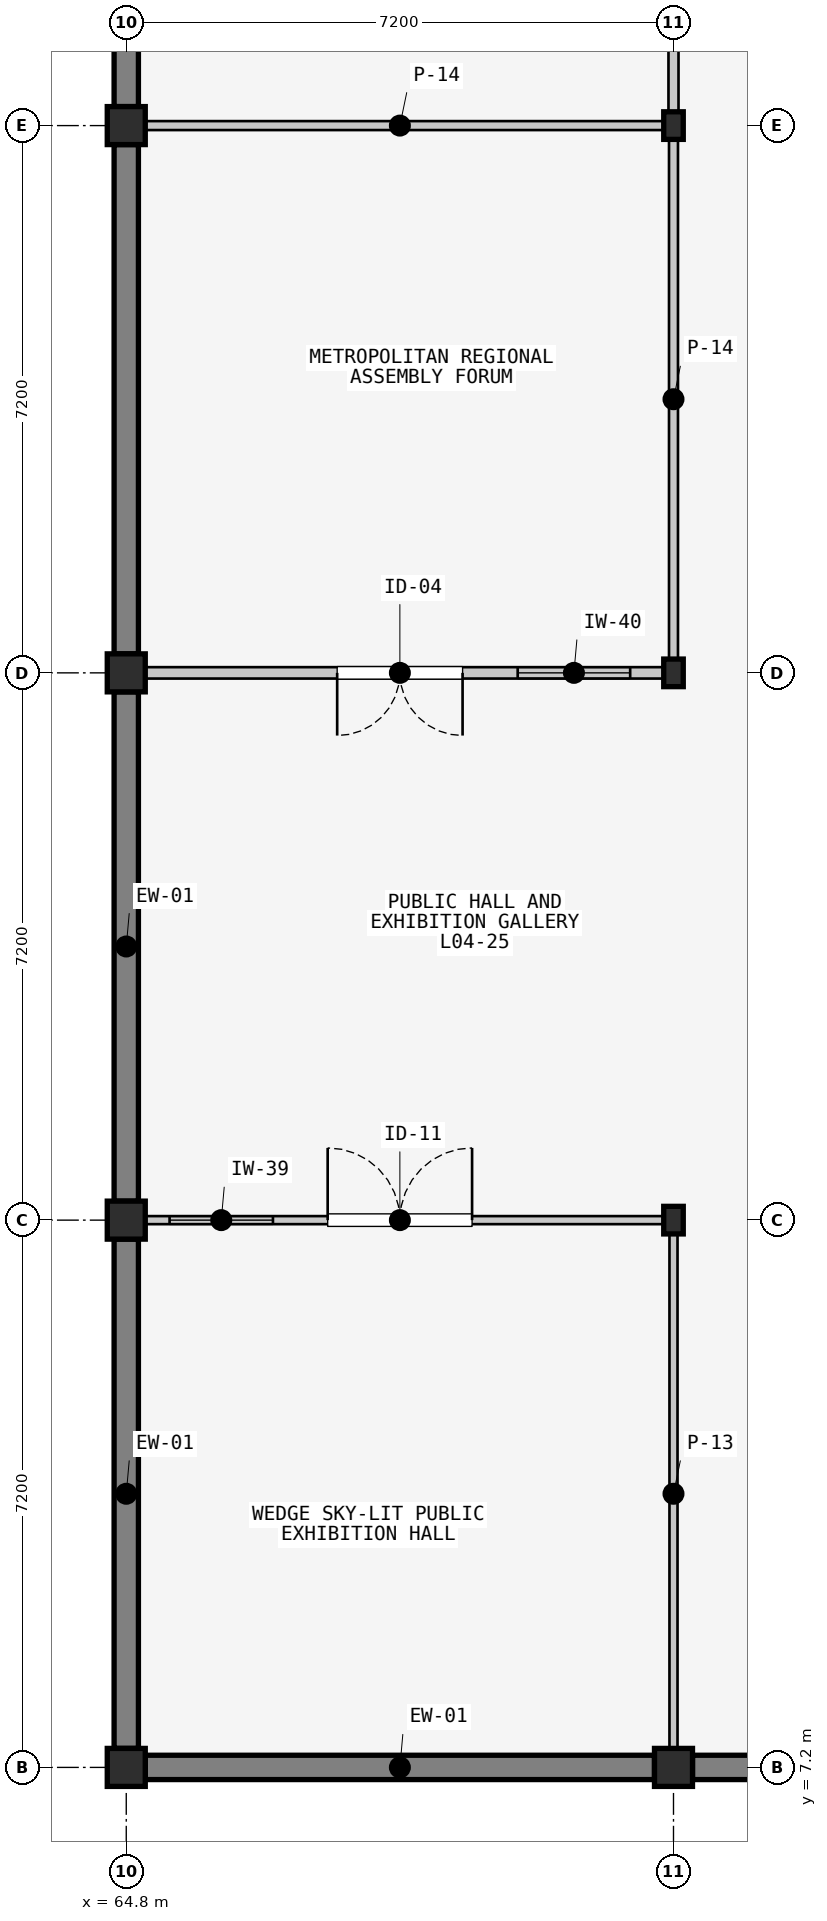
"""IFC4 building model, lengths in metres.
Left out: names, types, materials, properties, quantities, classifications, styles, units other than length and angle.
Written with IfcOpenShell. Run it as: python <this file> out.ifc"""

import sys

from ifc_helpers import new_model, si_unit, direction, frame, frame_2d, origin, origin_2d, place, context, subcontext, project, spatial, rectangle, i_section, extrude, element, fill, save


model = new_model("IFC4")
c1 = context("Model", 3, precision=1e-05, world=origin(), true_north=direction((0.0, 1.0)))
c2 = subcontext(c1, "Body", "Model", "MODEL_VIEW")
j1 = project(units=[si_unit("LENGTHUNIT", "METRE"), si_unit("PLANEANGLEUNIT", "RADIAN")], contexts=[c1])
p1 = place(None, origin())
s1 = spatial("IfcSite", under=j1, at=p1, CompositionType="ELEMENT")
p2 = place(p1, origin())
s2 = spatial("IfcBuilding", under=s1, at=p2, CompositionType="ELEMENT")
p3 = place(p2, frame((0.0, 0.0, 14.1)))
s3 = spatial("IfcBuildingStorey", under=s2, at=p3, CompositionType="ELEMENT", Elevation=14.1)
p4 = place(p3, frame((64.8, 7.2, 0.0), z_axis=(0.0, 0.0, 1.0), x_axis=(1.0, 0.0, 0.0)))
e1 = element("IfcColumn", 1, at=p4, inside=s3, PredefinedType="COLUMN", context=c2, shape_type="SweptSolid", body=[
    extrude(rectangle(XDim=0.5, YDim=0.5, at=origin_2d()), origin(), (0.0, 0.0, 1.0), 4.876),
])
p5 = place(p3, frame((64.8, 14.4, 0.0), z_axis=(0.0, 0.0, 1.0), x_axis=(1.0, 0.0, 0.0)))
e2 = element("IfcColumn", 2, at=p5, inside=s3, PredefinedType="COLUMN", context=c2, shape_type="SweptSolid", body=[
    extrude(rectangle(XDim=0.5, YDim=0.5, at=origin_2d()), origin(), (0.0, 0.0, 1.0), 6.219),
])
p6 = place(p3, frame((64.8, 21.6, 0.0), z_axis=(0.0, 0.0, 1.0), x_axis=(1.0, 0.0, 0.0)))
e3 = element("IfcColumn", 3, at=p6, inside=s3, PredefinedType="COLUMN", context=c2, shape_type="SweptSolid", body=[
    extrude(rectangle(XDim=0.5, YDim=0.5, at=origin_2d()), origin(), (0.0, 0.0, 1.0), 7.562),
])
p7 = place(p3, frame((64.8, 28.8, 0.0), z_axis=(0.0, 0.0, 1.0), x_axis=(1.0, 0.0, 0.0)))
e4 = element("IfcColumn", 4, at=p7, inside=s3, PredefinedType="COLUMN", context=c2, shape_type="SweptSolid", body=[
    extrude(rectangle(XDim=0.5, YDim=0.5, at=origin_2d()), origin(), (0.0, 0.0, 1.0), 8.905),
])
p8 = place(p3, frame((72.0, 7.2, 0.0), z_axis=(0.0, 0.0, 1.0), x_axis=(1.0, 0.0, 0.0)))
e5 = element("IfcColumn", 5, at=p8, inside=s3, PredefinedType="COLUMN", context=c2, shape_type="SweptSolid", body=[
    extrude(rectangle(XDim=0.5, YDim=0.5, at=origin_2d()), origin(), (0.0, 0.0, 1.0), 4.905),
])
p9 = place(p3, frame((72.0, 14.4, 0.0), z_axis=(0.0, 0.0, 1.0), x_axis=(1.0, 0.0, 0.0)))
e6 = element("IfcColumn", 6, at=p9, inside=s3, PredefinedType="COLUMN", context=c2, shape_type="SweptSolid", body=[
    extrude(i_section(OverallWidth=0.257, OverallDepth=0.363, WebThickness=0.013, FlangeThickness=0.022, FilletRadius=0.015, at=origin_2d()), origin(), (0.0, 0.0, 1.0), 6.248),
])
p10 = place(p3, frame((72.0, 21.6, 0.0), z_axis=(0.0, 0.0, 1.0), x_axis=(1.0, 0.0, 0.0)))
e7 = element("IfcColumn", 7, at=p10, inside=s3, PredefinedType="COLUMN", context=c2, shape_type="SweptSolid", body=[
    extrude(i_section(OverallWidth=0.257, OverallDepth=0.363, WebThickness=0.013, FlangeThickness=0.022, FilletRadius=0.015, at=origin_2d()), origin(), (0.0, 0.0, 1.0), 7.59),
])
p11 = place(p3, frame((72.0, 28.8, 0.0), z_axis=(0.0, 0.0, 1.0), x_axis=(1.0, 0.0, 0.0)))
e8 = element("IfcColumn", 8, at=p11, inside=s3, PredefinedType="COLUMN", context=c2, shape_type="SweptSolid", body=[
    extrude(i_section(OverallWidth=0.257, OverallDepth=0.363, WebThickness=0.013, FlangeThickness=0.022, FilletRadius=0.015, at=origin_2d()), origin(), (0.0, 0.0, 1.0), 8.933),
])
p12 = place(p3, frame((71.75, 7.2, 0.0), z_axis=(0.0, 0.0, 1.0), x_axis=(-1.0, 0.0, 0.0)))
e9 = element("IfcWall", 9, at=p12, inside=s3, PredefinedType="SOLIDWALL", context=c2, shape_type="SweptSolid", body=[
    extrude(rectangle(XDim=6.7, YDim=0.32, at=frame_2d((3.35, 0.0))), origin(), (0.0, 0.0, 1.0), 4.149),
])
p13 = place(p3, frame((64.8, 7.45, 0.0), z_axis=(0.0, 0.0, 1.0), x_axis=(0.0, 1.0, 0.0)))
e10 = element("IfcWall", 10, at=p13, inside=s3, PredefinedType="SOLIDWALL", context=c2, shape_type="SweptSolid", body=[
    extrude(rectangle(XDim=6.7, YDim=0.32, at=frame_2d((3.35, 0.0))), origin(), (0.0, 0.0, 1.0), 4.193),
])
p14 = place(p3, frame((64.8, 14.65, 0.0), z_axis=(0.0, 0.0, 1.0), x_axis=(0.0, 1.0, 0.0)))
e11 = element("IfcWall", 11, at=p14, inside=s3, PredefinedType="SOLIDWALL", context=c2, shape_type="SweptSolid", body=[
    extrude(rectangle(XDim=6.7, YDim=0.32, at=frame_2d((3.35, 0.0))), origin(), (0.0, 0.0, 1.0), 5.536),
])
p15 = place(p3, frame((64.8, 21.85, 0.0), z_axis=(0.0, 0.0, 1.0), x_axis=(0.0, 1.0, 0.0)))
e12 = element("IfcWall", 12, at=p15, inside=s3, PredefinedType="SOLIDWALL", context=c2, shape_type="SweptSolid", body=[
    extrude(rectangle(XDim=6.7, YDim=0.32, at=frame_2d((3.35, 0.0))), origin(), (0.0, 0.0, 1.0), 6.879),
])
p16 = place(p3, frame((64.8, 29.05, 0.0), z_axis=(0.0, 0.0, 1.0), x_axis=(0.0, 1.0, 0.0)))
e13 = element("IfcWall", 13, at=p16, inside=s3, PredefinedType="SOLIDWALL", context=c2, shape_type="SweptSolid", body=[
    extrude(rectangle(XDim=6.7, YDim=0.32, at=frame_2d((3.35, 0.0))), origin(), (0.0, 0.0, 1.0), 8.222),
])
p17 = place(p16, frame((0.908, 0.0, 0.95)))
e14 = element("IfcOpeningElement", 14, at=p17, cuts=e13, PredefinedType="OPENING", context=c2, shape_type="SweptSolid", body=[
    extrude(rectangle(XDim=1.4, YDim=2.1, at=frame_2d((0.7, 1.05))), frame((0.0, 0.17, 0.0), z_axis=(0.0, -1.0, 0.0), x_axis=(1.0, 0.0, 0.0)), (0.0, 0.0, 1.0), 0.34),
])
p18 = place(p16, frame((0.908, 0.0, 4.55)))
e15 = element("IfcOpeningElement", 15, at=p18, cuts=e13, PredefinedType="OPENING", context=c2, shape_type="SweptSolid", body=[
    extrude(rectangle(XDim=1.4, YDim=2.1, at=frame_2d((0.7, 1.05))), frame((0.0, 0.17, 0.0), z_axis=(0.0, -1.0, 0.0), x_axis=(1.0, 0.0, 0.0)), (0.0, 0.0, 1.0), 0.34),
])
p19 = place(p16, frame((4.392, 0.0, 0.95)))
e16 = element("IfcOpeningElement", 16, at=p19, cuts=e13, PredefinedType="OPENING", context=c2, shape_type="SweptSolid", body=[
    extrude(rectangle(XDim=1.4, YDim=2.1, at=frame_2d((0.7, 1.05))), frame((0.0, 0.17, 0.0), z_axis=(0.0, -1.0, 0.0), x_axis=(1.0, 0.0, 0.0)), (0.0, 0.0, 1.0), 0.34),
])
p20 = place(p16, frame((4.392, 0.0, 4.55)))
e17 = element("IfcOpeningElement", 17, at=p20, cuts=e13, PredefinedType="OPENING", context=c2, shape_type="SweptSolid", body=[
    extrude(rectangle(XDim=1.4, YDim=2.1, at=frame_2d((0.7, 1.05))), frame((0.0, 0.17, 0.0), z_axis=(0.0, -1.0, 0.0), x_axis=(1.0, 0.0, 0.0)), (0.0, 0.0, 1.0), 0.34),
])
p21 = place(p3, frame((78.95, 7.2, 0.0), z_axis=(0.0, 0.0, 1.0), x_axis=(-1.0, 0.0, 0.0)))
e18 = element("IfcWall", 18, at=p21, inside=s3, PredefinedType="SOLIDWALL", context=c2, shape_type="SweptSolid", body=[
    extrude(rectangle(XDim=6.7, YDim=0.32, at=frame_2d((3.35, 0.0))), origin(), (0.0, 0.0, 1.0), 4.177),
])
p22 = place(p3, frame((64.92, 14.4, 0.0), z_axis=(0.0, 0.0, 1.0), x_axis=(1.0, 0.0, 0.0)))
e19 = element("IfcWall", 19, at=p22, inside=s3, PredefinedType="PARTITIONING", context=c2, shape_type="SweptSolid", body=[
    extrude(rectangle(XDim=6.96, YDim=0.106, at=frame_2d((3.48, 0.0))), origin(), (0.0, 0.0, 1.0), 3.72),
])
p23 = place(p22, frame((2.53, 0.0, 0.0)))
e20 = element("IfcOpeningElement", 20, at=p23, cuts=e19, PredefinedType="OPENING", context=c2, shape_type="SweptSolid", body=[
    extrude(rectangle(XDim=1.9, YDim=2.45, at=frame_2d((0.95, 1.225))), frame((0.0, 0.063, 0.0), z_axis=(0.0, -1.0, 0.0), x_axis=(1.0, 0.0, 0.0)), (0.0, 0.0, 1.0), 0.126),
])
p24 = place(p22, frame((0.45, 0.0, 1.05)))
e21 = element("IfcOpeningElement", 21, at=p24, cuts=e19, PredefinedType="OPENING", context=c2, shape_type="SweptSolid", body=[
    extrude(rectangle(XDim=1.36, YDim=1.1, at=frame_2d((0.68, 0.55))), frame((0.0, 0.063, 0.0), z_axis=(0.0, -1.0, 0.0), x_axis=(1.0, 0.0, 0.0)), (0.0, 0.0, 1.0), 0.126),
])
p25 = place(p3, frame((72.0, 14.28, 0.0), z_axis=(0.0, 0.0, 1.0), x_axis=(0.0, -1.0, 0.0)))
e22 = element("IfcWall", 22, at=p25, inside=s3, PredefinedType="PARTITIONING", context=c2, shape_type="SweptSolid", body=[
    extrude(rectangle(XDim=6.96, YDim=0.106, at=frame_2d((3.48, 0.0))), origin(), (0.0, 0.0, 1.0), 3.72),
])
p26 = place(p3, frame((71.88, 21.6, 0.0), z_axis=(0.0, 0.0, 1.0), x_axis=(-1.0, 0.0, 0.0)))
e23 = element("IfcWall", 23, at=p26, inside=s3, PredefinedType="PARTITIONING", context=c2, shape_type="SweptSolid", body=[
    extrude(rectangle(XDim=6.96, YDim=0.15, at=frame_2d((3.48, 0.0))), origin(), (0.0, 0.0, 1.0), 3.72),
])
p27 = place(p26, frame((2.655, 0.0, 0.0)))
e24 = element("IfcOpeningElement", 24, at=p27, cuts=e23, PredefinedType="OPENING", context=c2, shape_type="SweptSolid", body=[
    extrude(rectangle(XDim=1.65, YDim=2.35, at=frame_2d((0.825, 1.175))), frame((0.0, 0.085, 0.0), z_axis=(0.0, -1.0, 0.0), x_axis=(1.0, 0.0, 0.0)), (0.0, 0.0, 1.0), 0.17),
])
p28 = place(p26, frame((0.45, 0.0, 1.05)))
e25 = element("IfcOpeningElement", 25, at=p28, cuts=e23, PredefinedType="OPENING", context=c2, shape_type="SweptSolid", body=[
    extrude(rectangle(XDim=1.48, YDim=1.34, at=frame_2d((0.74, 0.67))), frame((0.0, 0.085, 0.0), z_axis=(0.0, -1.0, 0.0), x_axis=(1.0, 0.0, 0.0)), (0.0, 0.0, 1.0), 0.17),
])
for number, where, z_axis, x_axis in (
    (26, (64.92, 28.8, 0.0), (0.0, 0.0, 1.0), (1.0, 0.0, 0.0)),
    (27, (72.0, 28.68, 0.0), (0.0, 0.0, 1.0), (0.0, -1.0, 0.0)),
):
    element("IfcWall", number, at=place(p3, frame(where, z_axis=z_axis, x_axis=x_axis)), inside=s3, PredefinedType="PARTITIONING", context=c2, shape_type="SweptSolid", body=[
        extrude(rectangle(XDim=6.96, YDim=0.118, at=frame_2d((3.48, 0.0))), origin(), (0.0, 0.0, 1.0), 3.72),
    ])
p29 = place(p3, frame((72.0, 35.88, 0.0), z_axis=(0.0, 0.0, 1.0), x_axis=(0.0, -1.0, 0.0)))
e28 = element("IfcWall", 28, at=p29, inside=s3, PredefinedType="PARTITIONING", context=c2, shape_type="SweptSolid", body=[
    extrude(rectangle(XDim=6.96, YDim=0.132, at=frame_2d((3.48, 0.0))), origin(), (0.0, 0.0, 1.0), 3.72),
])
p30 = place(p29, frame((2.705, 0.0, 0.0)))
e29 = element("IfcOpeningElement", 29, at=p30, cuts=e28, PredefinedType="OPENING", context=c2, shape_type="SweptSolid", body=[
    extrude(rectangle(XDim=1.55, YDim=2.3, at=frame_2d((0.775, 1.15))), frame((0.0, 0.076, 0.0), z_axis=(0.0, -1.0, 0.0), x_axis=(1.0, 0.0, 0.0)), (0.0, 0.0, 1.0), 0.152),
])
p31 = place(p29, frame((0.45, 0.0, 1.05)))
e30 = element("IfcOpeningElement", 30, at=p31, cuts=e28, PredefinedType="OPENING", context=c2, shape_type="SweptSolid", body=[
    extrude(rectangle(XDim=1.58, YDim=1.34, at=frame_2d((0.79, 0.67))), frame((0.0, 0.076, 0.0), z_axis=(0.0, -1.0, 0.0), x_axis=(1.0, 0.0, 0.0)), (0.0, 0.0, 1.0), 0.152),
])
p32 = place(p23, origin())
e31 = element("IfcDoor", 31, at=p32, inside=s3, OperationType="DOUBLE_DOOR_SINGLE_SWING", PredefinedType="DOOR", context=c2, shape_type="SweptSolid", body=[
    extrude(rectangle(XDim=1.9, YDim=2.45, at=frame_2d((0.95, 1.225))), frame((0.0, 0.025, 0.0), z_axis=(0.0, -1.0, 0.0), x_axis=(1.0, 0.0, 0.0)), (0.0, 0.0, 1.0), 0.05),
])
fill(e20, e31)
p33 = place(p24, origin())
e32 = element("IfcWindow", 32, at=p33, inside=s3, PartitioningType="SINGLE_PANEL", PredefinedType="WINDOW", context=c2, shape_type="SweptSolid", body=[
    extrude(rectangle(XDim=1.36, YDim=1.1, at=frame_2d((0.68, 0.55))), frame((0.0, 0.03, 0.0), z_axis=(0.0, -1.0, 0.0), x_axis=(1.0, 0.0, 0.0)), (0.0, 0.0, 1.0), 0.06),
])
fill(e21, e32)
p34 = place(p27, origin())
e33 = element("IfcDoor", 33, at=p34, inside=s3, OperationType="DOUBLE_DOOR_SINGLE_SWING", PredefinedType="DOOR", context=c2, shape_type="SweptSolid", body=[
    extrude(rectangle(XDim=1.65, YDim=2.35, at=frame_2d((0.825, 1.175))), frame((0.0, 0.025, 0.0), z_axis=(0.0, -1.0, 0.0), x_axis=(1.0, 0.0, 0.0)), (0.0, 0.0, 1.0), 0.05),
])
fill(e24, e33)
p35 = place(p28, origin())
e34 = element("IfcWindow", 34, at=p35, inside=s3, PartitioningType="SINGLE_PANEL", PredefinedType="WINDOW", context=c2, shape_type="SweptSolid", body=[
    extrude(rectangle(XDim=1.48, YDim=1.34, at=frame_2d((0.74, 0.67))), frame((0.0, 0.03, 0.0), z_axis=(0.0, -1.0, 0.0), x_axis=(1.0, 0.0, 0.0)), (0.0, 0.0, 1.0), 0.06),
])
fill(e25, e34)
save(model, sys.argv[1])
